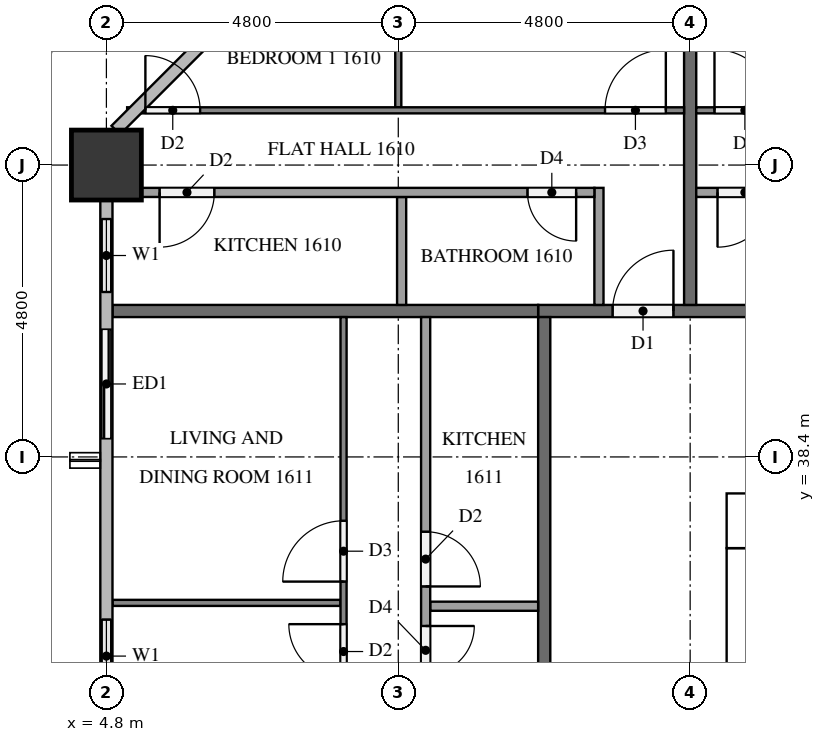
"""IFC4 building model, lengths in metres.
Left out: names, types, materials, properties, quantities, classifications, styles, units other than length and angle.
Written with IfcOpenShell. Run it as: python <this file> out.ifc"""

import sys

from ifc_helpers import new_model, si_unit, direction, frame, frame_2d, origin, origin_2d, place, context, subcontext, project, spatial, rectangle, extrude, element, fill, save


model = new_model("IFC4")
c1 = context("Model", 3, precision=1e-05, world=origin(), true_north=direction((0.0, 1.0)))
c2 = subcontext(c1, "Body", "Model", "MODEL_VIEW")
j1 = project(units=[si_unit("LENGTHUNIT", "METRE"), si_unit("PLANEANGLEUNIT", "RADIAN")], contexts=[c1])
p1 = place(None, origin())
s1 = spatial("IfcSite", under=j1, at=p1, CompositionType="ELEMENT")
p2 = place(p1, origin())
s2 = spatial("IfcBuilding", under=s1, at=p2, CompositionType="ELEMENT")
p3 = place(p2, frame((0.0, 0.0, 66.3)))
s3 = spatial("IfcBuildingStorey", under=s2, at=p3, CompositionType="ELEMENT", Elevation=66.3)
p4 = place(p3, frame((15.0, 37.35, 0.0), z_axis=(0.0, 0.0, 1.0), x_axis=(1.0, 0.0, 0.0)))
e1 = element("IfcWall", 1, at=p4, inside=s3, PredefinedType="SHEAR", context=c2, shape_type="SweptSolid", body=[
    extrude(rectangle(XDim=32.4, YDim=0.9, at=frame_2d((16.2, 0.0))), origin(), (0.0, 0.0, 1.0), 3.2),
])
p5 = place(p4, frame((15.3, 0.0, 0.0)))
e2 = element("IfcOpeningElement", 2, at=p5, cuts=e1, PredefinedType="OPENING", context=c2, shape_type="SweptSolid", body=[
    extrude(rectangle(XDim=1.8, YDim=2.1, at=frame_2d((0.9, 1.05))), frame((0.0, 0.46, 0.0), z_axis=(0.0, -1.0, 0.0), x_axis=(1.0, 0.0, 0.0)), (0.0, 0.0, 1.0), 0.92),
])
p6 = place(p4, frame((1.794, 0.0, 0.0)))
e3 = element("IfcOpeningElement", 3, at=p6, cuts=e1, PredefinedType="OPENING", context=c2, shape_type="SweptSolid", body=[
    extrude(rectangle(XDim=1.0, YDim=2.1, at=frame_2d((0.5, 1.05))), frame((0.0, 0.46, 0.0), z_axis=(0.0, -1.0, 0.0), x_axis=(1.0, 0.0, 0.0)), (0.0, 0.0, 1.0), 0.92),
])
p7 = place(p4, frame((5.331, 0.0, 0.0)))
e4 = element("IfcOpeningElement", 4, at=p7, cuts=e1, PredefinedType="OPENING", context=c2, shape_type="SweptSolid", body=[
    extrude(rectangle(XDim=1.0, YDim=2.1, at=frame_2d((0.5, 1.05))), frame((0.0, 0.46, 0.0), z_axis=(0.0, -1.0, 0.0), x_axis=(1.0, 0.0, 0.0)), (0.0, 0.0, 1.0), 0.92),
])
p8 = place(p3, frame((15.45, 15.9, 0.0), z_axis=(0.0, 0.0, 1.0), x_axis=(0.0, 1.0, 0.0)))
e5 = element("IfcWall", 5, at=p8, inside=s3, PredefinedType="SHEAR", context=c2, shape_type="SweptSolid", body=[
    extrude(rectangle(XDim=21.0, YDim=0.9, at=frame_2d((10.5, 0.0))), origin(), (0.0, 0.0, 1.0), 3.2),
])
p9 = place(p8, frame((4.86, 0.0, 0.0)))
e6 = element("IfcOpeningElement", 6, at=p9, cuts=e5, PredefinedType="OPENING", context=c2, shape_type="SweptSolid", body=[
    extrude(rectangle(XDim=1.2, YDim=2.1, at=frame_2d((0.6, 1.05))), frame((0.0, 0.46, 0.0), z_axis=(0.0, -1.0, 0.0), x_axis=(1.0, 0.0, 0.0)), (0.0, 0.0, 1.0), 0.92),
])
p10 = place(p3, frame((4.8, 43.2, 0.0), z_axis=(0.0, 0.0, 1.0), x_axis=(1.0, 0.0, 0.0)))
e7 = element("IfcColumn", 7, at=p10, inside=s3, PredefinedType="COLUMN", context=c2, shape_type="SweptSolid", body=[
    extrude(rectangle(XDim=1.15, YDim=1.15, at=origin_2d()), origin(), (0.0, 0.0, 1.0), 3.2),
])
p11 = place(p3, frame((4.8, 42.625, 0.0), z_axis=(0.0, 0.0, 1.0), x_axis=(0.0, -1.0, 0.0)))
e8 = element("IfcWall", 8, at=p11, inside=s3, PredefinedType="SOLIDWALL", context=c2, shape_type="SweptSolid", body=[
    extrude(rectangle(XDim=4.225, YDim=0.15, at=frame_2d((2.113, 0.0))), origin(), (0.0, 0.0, 1.0), 3.2),
])
p12 = place(p11, frame((0.312, 0.0, 0.9)))
e9 = element("IfcOpeningElement", 9, at=p12, cuts=e8, PredefinedType="OPENING", context=c2, shape_type="SweptSolid", body=[
    extrude(rectangle(XDim=1.2, YDim=1.4, at=frame_2d((0.6, 0.7))), frame((0.0, 0.085, 0.0), z_axis=(0.0, -1.0, 0.0), x_axis=(1.0, 0.0, 0.0)), (0.0, 0.0, 1.0), 0.17),
])
p13 = place(p11, frame((2.125, 0.0, 0.0)))
e10 = element("IfcOpeningElement", 10, at=p13, cuts=e8, PredefinedType="OPENING", context=c2, shape_type="SweptSolid", body=[
    extrude(rectangle(XDim=1.8, YDim=2.4, at=frame_2d((0.9, 1.2))), frame((0.0, 0.085, 0.0), z_axis=(0.0, -1.0, 0.0), x_axis=(1.0, 0.0, 0.0)), (0.0, 0.0, 1.0), 0.17),
])
p14 = place(p3, frame((4.8, 36.0, 0.0), z_axis=(0.0, 0.0, 1.0), x_axis=(0.0, -1.0, 0.0)))
e11 = element("IfcWall", 11, at=p14, inside=s3, PredefinedType="SOLIDWALL", context=c2, shape_type="SweptSolid", body=[
    extrude(rectangle(XDim=1.75, YDim=0.15, at=frame_2d((0.875, 0.0))), origin(), (0.0, 0.0, 1.0), 3.2),
])
p15 = place(p14, frame((0.275, 0.0, 0.9)))
e12 = element("IfcOpeningElement", 12, at=p15, cuts=e11, PredefinedType="OPENING", context=c2, shape_type="SweptSolid", body=[
    extrude(rectangle(XDim=1.2, YDim=1.4, at=frame_2d((0.6, 0.7))), frame((0.0, 0.085, 0.0), z_axis=(0.0, -1.0, 0.0), x_axis=(1.0, 0.0, 0.0)), (0.0, 0.0, 1.0), 0.17),
])
p16 = place(p3, frame((11.9, 40.8, 0.0), z_axis=(0.0, 0.0, 1.0), x_axis=(1.0, 0.0, 0.0)))
e13 = element("IfcWall", 13, at=p16, inside=s3, PredefinedType="PARTITIONING", context=c2, shape_type="SweptSolid", body=[
    extrude(rectangle(XDim=38.6, YDim=0.2, at=frame_2d((19.3, 0.0))), origin(), (0.0, 0.0, 1.0), 3.2),
])
p17 = place(p16, frame((36.375, 0.0, 0.0)))
e14 = element("IfcOpeningElement", 14, at=p17, cuts=e13, PredefinedType="OPENING", context=c2, shape_type="SweptSolid", body=[
    extrude(rectangle(XDim=1.0, YDim=2.1, at=frame_2d((0.5, 1.05))), frame((0.0, 0.11, 0.0), z_axis=(0.0, -1.0, 0.0), x_axis=(1.0, 0.0, 0.0)), (0.0, 0.0, 1.0), 0.22),
])
p18 = place(p16, frame((17.125, 0.0, 0.0)))
e15 = element("IfcOpeningElement", 15, at=p18, cuts=e13, PredefinedType="OPENING", context=c2, shape_type="SweptSolid", body=[
    extrude(rectangle(XDim=1.1, YDim=2.1, at=frame_2d((0.55, 1.05))), frame((0.0, 0.11, 0.0), z_axis=(0.0, -1.0, 0.0), x_axis=(1.0, 0.0, 0.0)), (0.0, 0.0, 1.0), 0.22),
])
p19 = place(p16, frame((15.625, 0.0, 0.0)))
e16 = element("IfcOpeningElement", 16, at=p19, cuts=e13, PredefinedType="OPENING", context=c2, shape_type="SweptSolid", body=[
    extrude(rectangle(XDim=1.0, YDim=2.1, at=frame_2d((0.5, 1.05))), frame((0.0, 0.11, 0.0), z_axis=(0.0, -1.0, 0.0), x_axis=(1.0, 0.0, 0.0)), (0.0, 0.0, 1.0), 0.22),
])
p20 = place(p16, frame((1.225, 0.0, 0.0)))
e17 = element("IfcOpeningElement", 17, at=p20, cuts=e13, PredefinedType="OPENING", context=c2, shape_type="SweptSolid", body=[
    extrude(rectangle(XDim=1.0, YDim=2.1, at=frame_2d((0.5, 1.05))), frame((0.0, 0.11, 0.0), z_axis=(0.0, -1.0, 0.0), x_axis=(1.0, 0.0, 0.0)), (0.0, 0.0, 1.0), 0.22),
])
p21 = place(p3, frame((12.0, 12.1, 0.0), z_axis=(0.0, 0.0, 1.0), x_axis=(0.0, 1.0, 0.0)))
e18 = element("IfcWall", 18, at=p21, inside=s3, PredefinedType="PARTITIONING", context=c2, shape_type="SweptSolid", body=[
    extrude(rectangle(XDim=28.6, YDim=0.2, at=frame_2d((14.3, 0.0))), origin(), (0.0, 0.0, 1.0), 3.2),
])
p22 = place(p21, frame((19.375, 0.0, 0.0)))
e19 = element("IfcOpeningElement", 19, at=p22, cuts=e18, PredefinedType="OPENING", context=c2, shape_type="SweptSolid", body=[
    extrude(rectangle(XDim=1.0, YDim=2.1, at=frame_2d((0.5, 1.05))), frame((0.0, 0.11, 0.0), z_axis=(0.0, -1.0, 0.0), x_axis=(1.0, 0.0, 0.0)), (0.0, 0.0, 1.0), 0.22),
])
p23 = place(p21, frame((12.175, 0.0, 0.0)))
e20 = element("IfcOpeningElement", 20, at=p23, cuts=e18, PredefinedType="OPENING", context=c2, shape_type="SweptSolid", body=[
    extrude(rectangle(XDim=1.0, YDim=2.1, at=frame_2d((0.5, 1.05))), frame((0.0, 0.11, 0.0), z_axis=(0.0, -1.0, 0.0), x_axis=(1.0, 0.0, 0.0)), (0.0, 0.0, 1.0), 0.22),
])
p24 = place(p21, frame((2.575, 0.0, 0.0)))
e21 = element("IfcOpeningElement", 21, at=p24, cuts=e18, PredefinedType="OPENING", context=c2, shape_type="SweptSolid", body=[
    extrude(rectangle(XDim=1.0, YDim=2.1, at=frame_2d((0.5, 1.05))), frame((0.0, 0.11, 0.0), z_axis=(0.0, -1.0, 0.0), x_axis=(1.0, 0.0, 0.0)), (0.0, 0.0, 1.0), 0.22),
])
p25 = place(p21, frame((1.025, 0.0, 0.0)))
e22 = element("IfcOpeningElement", 22, at=p25, cuts=e18, PredefinedType="OPENING", context=c2, shape_type="SweptSolid", body=[
    extrude(rectangle(XDim=1.0, YDim=2.1, at=frame_2d((0.5, 1.05))), frame((0.0, 0.11, 0.0), z_axis=(0.0, -1.0, 0.0), x_axis=(1.0, 0.0, 0.0)), (0.0, 0.0, 1.0), 0.22),
])
for number, where, z_axis, x_axis in (
    (23, (14.4, 47.9, 0.0), (0.0, 0.0, 1.0), (0.0, -1.0, 0.0)),
    (24, (4.9, 40.8, 0.0), (0.0, 0.0, 1.0), (1.0, 0.0, 0.0)),
):
    element("IfcWall", number, at=place(p3, frame(where, z_axis=z_axis, x_axis=x_axis)), inside=s3, PredefinedType="PARTITIONING", context=c2, shape_type="SweptSolid", body=[
        extrude(rectangle(XDim=7.0, YDim=0.2, at=frame_2d((3.5, 0.0))), origin(), (0.0, 0.0, 1.0), 3.2),
    ])
p26 = place(p3, frame((14.5, 44.1, 0.0), z_axis=(0.0, 0.0, 1.0), x_axis=(1.0, 0.0, 0.0)))
e25 = element("IfcWall", 25, at=p26, inside=s3, PredefinedType="PARTITIONING", context=c2, shape_type="SweptSolid", body=[
    extrude(rectangle(XDim=14.2, YDim=0.1, at=frame_2d((7.1, 0.0))), origin(), (0.0, 0.0, 1.0), 3.2),
])
p27 = place(p26, frame((9.85, 0.0, 0.0)))
e26 = element("IfcOpeningElement", 26, at=p27, cuts=e25, PredefinedType="OPENING", context=c2, shape_type="SweptSolid", body=[
    extrude(rectangle(XDim=0.9, YDim=2.1, at=frame_2d((0.45, 1.05))), frame((0.0, 0.06, 0.0), z_axis=(0.0, -1.0, 0.0), x_axis=(1.0, 0.0, 0.0)), (0.0, 0.0, 1.0), 0.12),
])
p28 = place(p26, frame((8.25, 0.0, 0.0)))
e27 = element("IfcOpeningElement", 27, at=p28, cuts=e25, PredefinedType="OPENING", context=c2, shape_type="SweptSolid", body=[
    extrude(rectangle(XDim=0.9, YDim=2.1, at=frame_2d((0.45, 1.05))), frame((0.0, 0.06, 0.0), z_axis=(0.0, -1.0, 0.0), x_axis=(1.0, 0.0, 0.0)), (0.0, 0.0, 1.0), 0.12),
])
p29 = place(p26, frame((0.3, 0.0, 0.0)))
e28 = element("IfcOpeningElement", 28, at=p29, cuts=e25, PredefinedType="OPENING", context=c2, shape_type="SweptSolid", body=[
    extrude(rectangle(XDim=1.0, YDim=2.1, at=frame_2d((0.5, 1.05))), frame((0.0, 0.06, 0.0), z_axis=(0.0, -1.0, 0.0), x_axis=(1.0, 0.0, 0.0)), (0.0, 0.0, 1.0), 0.12),
])
p30 = place(p3, frame((27.225, 42.75, 0.0), z_axis=(0.0, 0.0, 1.0), x_axis=(-1.0, 0.0, 0.0)))
e29 = element("IfcWall", 29, at=p30, inside=s3, PredefinedType="PARTITIONING", context=c2, shape_type="SweptSolid", body=[
    extrude(rectangle(XDim=12.725, YDim=0.15, at=frame_2d((6.363, 0.0))), origin(), (0.0, 0.0, 1.0), 3.2),
])
p31 = place(p30, frame((1.812, 0.0, 0.0)))
e30 = element("IfcOpeningElement", 30, at=p31, cuts=e29, PredefinedType="OPENING", context=c2, shape_type="SweptSolid", body=[
    extrude(rectangle(XDim=0.8, YDim=2.1, at=frame_2d((0.4, 1.05))), frame((0.0, 0.085, 0.0), z_axis=(0.0, -1.0, 0.0), x_axis=(1.0, 0.0, 0.0)), (0.0, 0.0, 1.0), 0.17),
])
p32 = place(p30, frame((3.261, 0.0, 0.0)))
e31 = element("IfcOpeningElement", 31, at=p32, cuts=e29, PredefinedType="OPENING", context=c2, shape_type="SweptSolid", body=[
    extrude(rectangle(XDim=0.9, YDim=2.1, at=frame_2d((0.45, 1.05))), frame((0.0, 0.085, 0.0), z_axis=(0.0, -1.0, 0.0), x_axis=(1.0, 0.0, 0.0)), (0.0, 0.0, 1.0), 0.17),
])
p33 = place(p30, frame((11.475, 0.0, 0.0)))
e32 = element("IfcOpeningElement", 32, at=p33, cuts=e29, PredefinedType="OPENING", context=c2, shape_type="SweptSolid", body=[
    extrude(rectangle(XDim=0.9, YDim=2.1, at=frame_2d((0.45, 1.05))), frame((0.0, 0.085, 0.0), z_axis=(0.0, -1.0, 0.0), x_axis=(1.0, 0.0, 0.0)), (0.0, 0.0, 1.0), 0.17),
])
p34 = place(p3, frame((9.6, 44.15, 0.0), z_axis=(0.0, 0.0, 1.0), x_axis=(0.0, 1.0, 0.0)))
e33 = element("IfcWall", 33, at=p34, inside=s3, PredefinedType="PARTITIONING", context=c2, shape_type="SweptSolid", body=[
    extrude(rectangle(XDim=3.275, YDim=0.1, at=frame_2d((1.638, 0.0))), origin(), (0.0, 0.0, 1.0), 3.2),
])
p35 = place(p3, frame((5.141, 44.1, 0.0), z_axis=(0.0, 0.0, 1.0), x_axis=(1.0, 0.0, 0.0)))
e34 = element("IfcWall", 34, at=p35, inside=s3, PredefinedType="PARTITIONING", context=c2, shape_type="SweptSolid", body=[
    extrude(rectangle(XDim=9.159, YDim=0.1, at=frame_2d((4.58, 0.0))), origin(), (0.0, 0.0, 1.0), 3.2),
])
p36 = place(p35, frame((7.859, 0.0, 0.0)))
e35 = element("IfcOpeningElement", 35, at=p36, cuts=e34, PredefinedType="OPENING", context=c2, shape_type="SweptSolid", body=[
    extrude(rectangle(XDim=1.0, YDim=2.1, at=frame_2d((0.5, 1.05))), frame((0.0, 0.06, 0.0), z_axis=(0.0, -1.0, 0.0), x_axis=(1.0, 0.0, 0.0)), (0.0, 0.0, 1.0), 0.12),
])
p37 = place(p35, frame((0.3, 0.0, 0.0)))
e36 = element("IfcOpeningElement", 36, at=p37, cuts=e34, PredefinedType="OPENING", context=c2, shape_type="SweptSolid", body=[
    extrude(rectangle(XDim=0.9, YDim=2.1, at=frame_2d((0.45, 1.05))), frame((0.0, 0.06, 0.0), z_axis=(0.0, -1.0, 0.0), x_axis=(1.0, 0.0, 0.0)), (0.0, 0.0, 1.0), 0.12),
])
p38 = place(p3, frame((9.655, 40.9, 0.0), z_axis=(0.0, 0.0, 1.0), x_axis=(0.0, 1.0, 0.0)))
e37 = element("IfcWall", 37, at=p38, inside=s3, PredefinedType="PARTITIONING", context=c2, shape_type="SweptSolid", body=[
    extrude(rectangle(XDim=1.775, YDim=0.15, at=frame_2d((0.888, 0.0))), origin(), (0.0, 0.0, 1.0), 3.2),
])
p39 = place(p3, frame((12.9, 40.9, 0.0), z_axis=(0.0, 0.0, 1.0), x_axis=(0.0, 1.0, 0.0)))
e38 = element("IfcWall", 38, at=p39, inside=s3, PredefinedType="PARTITIONING", context=c2, shape_type="SweptSolid", body=[
    extrude(rectangle(XDim=1.925, YDim=0.15, at=frame_2d((0.962, 0.0))), origin(), (0.0, 0.0, 1.0), 3.2),
])
p40 = place(p3, frame((12.825, 42.75, 0.0), z_axis=(0.0, 0.0, 1.0), x_axis=(-1.0, 0.0, 0.0)))
e39 = element("IfcWall", 39, at=p40, inside=s3, PredefinedType="PARTITIONING", context=c2, shape_type="SweptSolid", body=[
    extrude(rectangle(XDim=7.45, YDim=0.15, at=frame_2d((3.725, 0.0))), origin(), (0.0, 0.0, 1.0), 3.2),
])
p41 = place(p40, frame((0.3, 0.0, 0.0)))
e40 = element("IfcOpeningElement", 40, at=p41, cuts=e39, PredefinedType="OPENING", context=c2, shape_type="SweptSolid", body=[
    extrude(rectangle(XDim=0.8, YDim=2.1, at=frame_2d((0.4, 1.05))), frame((0.0, 0.085, 0.0), z_axis=(0.0, -1.0, 0.0), x_axis=(1.0, 0.0, 0.0)), (0.0, 0.0, 1.0), 0.17),
])
p42 = place(p40, frame((6.25, 0.0, 0.0)))
e41 = element("IfcOpeningElement", 41, at=p42, cuts=e39, PredefinedType="OPENING", context=c2, shape_type="SweptSolid", body=[
    extrude(rectangle(XDim=0.9, YDim=2.1, at=frame_2d((0.45, 1.05))), frame((0.0, 0.085, 0.0), z_axis=(0.0, -1.0, 0.0), x_axis=(1.0, 0.0, 0.0)), (0.0, 0.0, 1.0), 0.17),
])
p43 = place(p3, frame((8.65, 36.0, 0.0), z_axis=(0.0, 0.0, 1.0), x_axis=(-1.0, 0.0, 0.0)))
e42 = element("IfcWall", 42, at=p43, inside=s3, PredefinedType="PARTITIONING", context=c2, shape_type="SweptSolid", body=[
    extrude(rectangle(XDim=3.75, YDim=0.1, at=frame_2d((1.875, 0.0))), origin(), (0.0, 0.0, 1.0), 3.2),
])
p44 = place(p3, frame((8.7, 31.3, 0.0), z_axis=(0.0, 0.0, 1.0), x_axis=(0.0, 1.0, 0.0)))
e43 = element("IfcWall", 43, at=p44, inside=s3, PredefinedType="PARTITIONING", context=c2, shape_type="SweptSolid", body=[
    extrude(rectangle(XDim=9.4, YDim=0.1, at=frame_2d((4.7, 0.0))), origin(), (0.0, 0.0, 1.0), 3.2),
])
p45 = place(p44, frame((3.45, 0.0, 0.0)))
e44 = element("IfcOpeningElement", 44, at=p45, cuts=e43, PredefinedType="OPENING", context=c2, shape_type="SweptSolid", body=[
    extrude(rectangle(XDim=0.9, YDim=2.1, at=frame_2d((0.45, 1.05))), frame((0.0, 0.06, 0.0), z_axis=(0.0, -1.0, 0.0), x_axis=(1.0, 0.0, 0.0)), (0.0, 0.0, 1.0), 0.12),
])
p46 = place(p44, frame((5.05, 0.0, 0.0)))
e45 = element("IfcOpeningElement", 45, at=p46, cuts=e43, PredefinedType="OPENING", context=c2, shape_type="SweptSolid", body=[
    extrude(rectangle(XDim=1.0, YDim=2.1, at=frame_2d((0.5, 1.05))), frame((0.0, 0.06, 0.0), z_axis=(0.0, -1.0, 0.0), x_axis=(1.0, 0.0, 0.0)), (0.0, 0.0, 1.0), 0.12),
])
p47 = place(p3, frame((11.9, 35.945, 0.0), z_axis=(0.0, 0.0, 1.0), x_axis=(-1.0, 0.0, 0.0)))
e46 = element("IfcWall", 46, at=p47, inside=s3, PredefinedType="PARTITIONING", context=c2, shape_type="SweptSolid", body=[
    extrude(rectangle(XDim=1.775, YDim=0.15, at=frame_2d((0.887, 0.0))), origin(), (0.0, 0.0, 1.0), 3.2),
])
p48 = place(p3, frame((10.05, 40.7, 0.0), z_axis=(0.0, 0.0, 1.0), x_axis=(0.0, -1.0, 0.0)))
e47 = element("IfcWall", 47, at=p48, inside=s3, PredefinedType="PARTITIONING", context=c2, shape_type="SweptSolid", body=[
    extrude(rectangle(XDim=7.925, YDim=0.15, at=frame_2d((3.962, 0.0))), origin(), (0.0, 0.0, 1.0), 3.2),
])
p49 = place(p48, frame((5.08, 0.0, 0.0)))
e48 = element("IfcOpeningElement", 48, at=p49, cuts=e47, PredefinedType="OPENING", context=c2, shape_type="SweptSolid", body=[
    extrude(rectangle(XDim=0.8, YDim=2.1, at=frame_2d((0.4, 1.05))), frame((0.0, 0.085, 0.0), z_axis=(0.0, -1.0, 0.0), x_axis=(1.0, 0.0, 0.0)), (0.0, 0.0, 1.0), 0.17),
])
p50 = place(p48, frame((3.53, 0.0, 0.0)))
e49 = element("IfcOpeningElement", 49, at=p50, cuts=e47, PredefinedType="OPENING", context=c2, shape_type="SweptSolid", body=[
    extrude(rectangle(XDim=0.9, YDim=2.1, at=frame_2d((0.45, 1.05))), frame((0.0, 0.085, 0.0), z_axis=(0.0, -1.0, 0.0), x_axis=(1.0, 0.0, 0.0)), (0.0, 0.0, 1.0), 0.17),
])
p51 = place(p12, origin())
e50 = element("IfcWindow", 50, at=p51, inside=s3, PartitioningType="SINGLE_PANEL", PredefinedType="WINDOW", context=c2, shape_type="SweptSolid", body=[
    extrude(rectangle(XDim=1.2, YDim=1.4, at=frame_2d((0.6, 0.7))), frame((0.0, 0.03, 0.0), z_axis=(0.0, -1.0, 0.0), x_axis=(1.0, 0.0, 0.0)), (0.0, 0.0, 1.0), 0.06),
])
fill(e9, e50)
p52 = place(p13, origin())
e51 = element("IfcDoor", 51, at=p52, inside=s3, OperationType="SLIDING_TO_RIGHT", PredefinedType="DOOR", context=c2, shape_type="SweptSolid", body=[
    extrude(rectangle(XDim=1.8, YDim=2.4, at=frame_2d((0.9, 1.2))), frame((0.0, 0.025, 0.0), z_axis=(0.0, -1.0, 0.0), x_axis=(1.0, 0.0, 0.0)), (0.0, 0.0, 1.0), 0.05),
])
fill(e10, e51)
p53 = place(p15, origin())
e52 = element("IfcWindow", 52, at=p53, inside=s3, PartitioningType="SINGLE_PANEL", PredefinedType="WINDOW", context=c2, shape_type="SweptSolid", body=[
    extrude(rectangle(XDim=1.2, YDim=1.4, at=frame_2d((0.6, 0.7))), frame((0.0, 0.03, 0.0), z_axis=(0.0, -1.0, 0.0), x_axis=(1.0, 0.0, 0.0)), (0.0, 0.0, 1.0), 0.06),
])
fill(e12, e52)
p54 = place(p20, origin())
e53 = element("IfcDoor", 53, at=p54, inside=s3, OperationType="SINGLE_SWING_RIGHT", PredefinedType="DOOR", context=c2, shape_type="SweptSolid", body=[
    extrude(rectangle(XDim=1.0, YDim=2.1, at=frame_2d((0.5, 1.05))), frame((0.0, 0.025, 0.0), z_axis=(0.0, -1.0, 0.0), x_axis=(1.0, 0.0, 0.0)), (0.0, 0.0, 1.0), 0.05),
])
fill(e17, e53)
p55 = place(p29, origin())
e54 = element("IfcDoor", 54, at=p55, inside=s3, OperationType="SINGLE_SWING_LEFT", PredefinedType="DOOR", context=c2, shape_type="SweptSolid", body=[
    extrude(rectangle(XDim=1.0, YDim=2.1, at=frame_2d((0.5, 1.05))), frame((0.0, 0.025, 0.0), z_axis=(0.0, -1.0, 0.0), x_axis=(1.0, 0.0, 0.0)), (0.0, 0.0, 1.0), 0.05),
])
fill(e28, e54)
p56 = place(p33, origin())
e55 = element("IfcDoor", 55, at=p56, inside=s3, OperationType="SINGLE_SWING_RIGHT", PredefinedType="DOOR", context=c2, shape_type="SweptSolid", body=[
    extrude(rectangle(XDim=0.9, YDim=2.1, at=frame_2d((0.45, 1.05))), frame((0.0, 0.025, 0.0), z_axis=(0.0, -1.0, 0.0), x_axis=(1.0, 0.0, 0.0)), (0.0, 0.0, 1.0), 0.05),
])
fill(e32, e55)
p57 = place(p36, origin())
e56 = element("IfcDoor", 56, at=p57, inside=s3, OperationType="SINGLE_SWING_RIGHT", PredefinedType="DOOR", context=c2, shape_type="SweptSolid", body=[
    extrude(rectangle(XDim=1.0, YDim=2.1, at=frame_2d((0.5, 1.05))), frame((0.0, 0.025, 0.0), z_axis=(0.0, -1.0, 0.0), x_axis=(1.0, 0.0, 0.0)), (0.0, 0.0, 1.0), 0.05),
])
fill(e35, e56)
p58 = place(p37, origin())
e57 = element("IfcDoor", 57, at=p58, inside=s3, OperationType="SINGLE_SWING_LEFT", PredefinedType="DOOR", context=c2, shape_type="SweptSolid", body=[
    extrude(rectangle(XDim=0.9, YDim=2.1, at=frame_2d((0.45, 1.05))), frame((0.0, 0.025, 0.0), z_axis=(0.0, -1.0, 0.0), x_axis=(1.0, 0.0, 0.0)), (0.0, 0.0, 1.0), 0.05),
])
fill(e36, e57)
p59 = place(p41, origin())
e58 = element("IfcDoor", 58, at=p59, inside=s3, OperationType="SINGLE_SWING_LEFT", PredefinedType="DOOR", context=c2, shape_type="SweptSolid", body=[
    extrude(rectangle(XDim=0.8, YDim=2.1, at=frame_2d((0.4, 1.05))), frame((0.0, 0.025, 0.0), z_axis=(0.0, -1.0, 0.0), x_axis=(1.0, 0.0, 0.0)), (0.0, 0.0, 1.0), 0.05),
])
fill(e40, e58)
p60 = place(p42, origin())
e59 = element("IfcDoor", 59, at=p60, inside=s3, OperationType="SINGLE_SWING_RIGHT", PredefinedType="DOOR", context=c2, shape_type="SweptSolid", body=[
    extrude(rectangle(XDim=0.9, YDim=2.1, at=frame_2d((0.45, 1.05))), frame((0.0, 0.025, 0.0), z_axis=(0.0, -1.0, 0.0), x_axis=(1.0, 0.0, 0.0)), (0.0, 0.0, 1.0), 0.05),
])
fill(e41, e59)
p61 = place(p45, origin())
e60 = element("IfcDoor", 60, at=p61, inside=s3, OperationType="SINGLE_SWING_RIGHT", PredefinedType="DOOR", context=c2, shape_type="SweptSolid", body=[
    extrude(rectangle(XDim=0.9, YDim=2.1, at=frame_2d((0.45, 1.05))), frame((0.0, 0.025, 0.0), z_axis=(0.0, -1.0, 0.0), x_axis=(1.0, 0.0, 0.0)), (0.0, 0.0, 1.0), 0.05),
])
fill(e44, e60)
p62 = place(p46, origin())
e61 = element("IfcDoor", 61, at=p62, inside=s3, OperationType="SINGLE_SWING_LEFT", PredefinedType="DOOR", context=c2, shape_type="SweptSolid", body=[
    extrude(rectangle(XDim=1.0, YDim=2.1, at=frame_2d((0.5, 1.05))), frame((0.0, 0.025, 0.0), z_axis=(0.0, -1.0, 0.0), x_axis=(1.0, 0.0, 0.0)), (0.0, 0.0, 1.0), 0.05),
])
fill(e45, e61)
p63 = place(p49, origin())
e62 = element("IfcDoor", 62, at=p63, inside=s3, OperationType="SINGLE_SWING_LEFT", PredefinedType="DOOR", context=c2, shape_type="SweptSolid", body=[
    extrude(rectangle(XDim=0.8, YDim=2.1, at=frame_2d((0.4, 1.05))), frame((0.0, 0.025, 0.0), z_axis=(0.0, -1.0, 0.0), x_axis=(1.0, 0.0, 0.0)), (0.0, 0.0, 1.0), 0.05),
])
fill(e48, e62)
p64 = place(p50, origin())
e63 = element("IfcDoor", 63, at=p64, inside=s3, OperationType="SINGLE_SWING_RIGHT", PredefinedType="DOOR", context=c2, shape_type="SweptSolid", body=[
    extrude(rectangle(XDim=0.9, YDim=2.1, at=frame_2d((0.45, 1.05))), frame((0.0, 0.025, 0.0), z_axis=(0.0, -1.0, 0.0), x_axis=(1.0, 0.0, 0.0)), (0.0, 0.0, 1.0), 0.05),
])
fill(e49, e63)
save(model, sys.argv[1])
